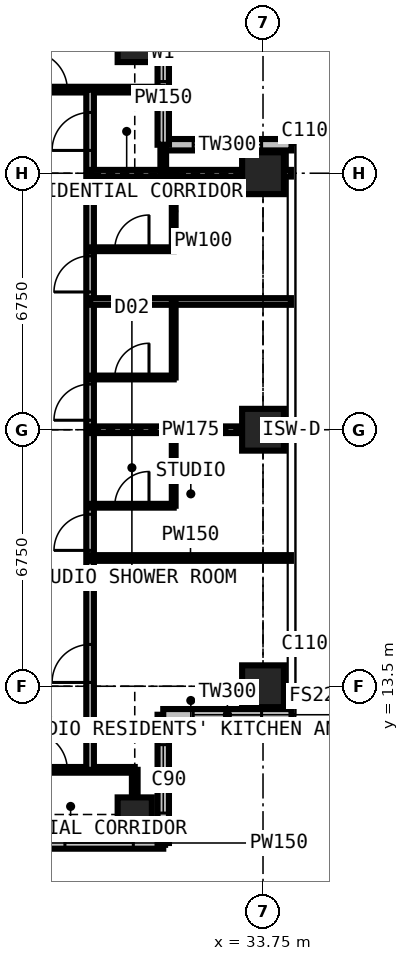
"""IFC4 building model, lengths in metres.
Left out: names, types, materials, properties, quantities, classifications, styles, units other than length and angle.
Written with IfcOpenShell. Run it as: python <this file> out.ifc"""

import sys

from ifc_helpers import new_model, si_unit, direction, frame, frame_2d, origin, origin_2d, place, context, subcontext, project, spatial, rectangle, extrude, element, fill, save


model = new_model("IFC4")
c1 = context("Model", 3, precision=1e-05, world=origin(), true_north=direction((0.0, 1.0)))
c2 = subcontext(c1, "Body", "Model", "MODEL_VIEW")
j1 = project(units=[si_unit("LENGTHUNIT", "METRE"), si_unit("PLANEANGLEUNIT", "RADIAN")], contexts=[c1])
p1 = place(None, origin())
s1 = spatial("IfcSite", under=j1, at=p1, CompositionType="ELEMENT")
p2 = place(p1, origin())
s2 = spatial("IfcBuilding", under=s1, at=p2, CompositionType="ELEMENT")
p3 = place(p2, frame((0.0, 0.0, 211.5)))
s3 = spatial("IfcBuildingStorey", under=s2, at=p3, CompositionType="ELEMENT", Elevation=211.5)
for number, where, z_axis, x_axis in (
    (1, (30.375, 10.125, 0.0), (0.0, 0.0, 1.0), (1.0, 0.0, 0.0)),
    (2, (30.375, 30.375, 0.0), (0.0, 0.0, 1.0), (1.0, 0.0, 0.0)),
):
    element("IfcColumn", number, at=place(p3, frame(where, z_axis=z_axis, x_axis=x_axis)), inside=s3, PredefinedType="COLUMN", context=c2, shape_type="SweptSolid", body=[
        extrude(rectangle(XDim=0.9, YDim=0.9, at=origin_2d()), origin(), (0.0, 0.0, 1.0), 3.6),
    ])
for number, where, z_axis, x_axis in (
    (3, (33.75, 13.5, 0.0), (0.0, 0.0, 1.0), (1.0, 0.0, 0.0)),
    (4, (33.75, 20.25, 0.0), (0.0, 0.0, 1.0), (1.0, 0.0, 0.0)),
    (5, (33.75, 27.0, 0.0), (0.0, 0.0, 1.0), (1.0, 0.0, 0.0)),
):
    element("IfcColumn", number, at=place(p3, frame(where, z_axis=z_axis, x_axis=x_axis)), inside=s3, PredefinedType="COLUMN", context=c2, shape_type="SweptSolid", body=[
        extrude(rectangle(XDim=1.1, YDim=1.1, at=origin_2d()), origin(), (0.0, 0.0, 1.0), 3.6),
    ])
p4 = place(p3, frame((34.5, 27.75, 0.0), z_axis=(0.0, 0.0, 1.0), x_axis=(-1.0, 0.0, 0.0)))
e6 = element("IfcWall", 6, at=p4, inside=s3, PredefinedType="SOLIDWALL", context=c2, shape_type="SweptSolid", body=[
    extrude(rectangle(XDim=3.375, YDim=0.3, at=frame_2d((1.688, 0.0))), origin(), (0.0, 0.0, 1.0), 3.375),
])
p5 = place(p4, frame((0.788, 0.0, 0.6)))
e7 = element("IfcOpeningElement", 7, at=p5, cuts=e6, PredefinedType="OPENING", context=c2, shape_type="SweptSolid", body=[
    extrude(rectangle(XDim=1.8, YDim=2.1, at=frame_2d((0.9, 1.05))), frame((0.0, 0.16, 0.0), z_axis=(0.0, -1.0, 0.0), x_axis=(1.0, 0.0, 0.0)), (0.0, 0.0, 1.0), 0.32),
])
p6 = place(p3, frame((31.125, 27.75, 0.0), z_axis=(0.0, 0.0, 1.0), x_axis=(0.0, 1.0, 0.0)))
e8 = element("IfcWall", 8, at=p6, inside=s3, PredefinedType="SOLIDWALL", context=c2, shape_type="SweptSolid", body=[
    extrude(rectangle(XDim=3.375, YDim=0.3, at=frame_2d((1.688, 0.0))), origin(), (0.0, 0.0, 1.0), 3.375),
])
p7 = place(p6, frame((1.663, 0.0, 0.9)))
e9 = element("IfcOpeningElement", 9, at=p7, cuts=e8, PredefinedType="OPENING", context=c2, shape_type="SweptSolid", body=[
    extrude(rectangle(XDim=1.5, YDim=1.8, at=frame_2d((0.75, 0.9))), frame((0.0, 0.16, 0.0), z_axis=(0.0, -1.0, 0.0), x_axis=(1.0, 0.0, 0.0)), (0.0, 0.0, 1.0), 0.32),
])
p8 = place(p3, frame((27.75, 9.375, 0.0), z_axis=(0.0, 0.0, 1.0), x_axis=(1.0, 0.0, 0.0)))
e10 = element("IfcWall", 10, at=p8, inside=s3, PredefinedType="SOLIDWALL", context=c2, shape_type="SweptSolid", body=[
    extrude(rectangle(XDim=3.375, YDim=0.3, at=frame_2d((1.688, 0.0))), origin(), (0.0, 0.0, 1.0), 3.375),
])
p9 = place(p8, frame((0.788, 0.0, 0.6)))
e11 = element("IfcOpeningElement", 11, at=p9, cuts=e10, PredefinedType="OPENING", context=c2, shape_type="SweptSolid", body=[
    extrude(rectangle(XDim=1.8, YDim=2.1, at=frame_2d((0.9, 1.05))), frame((0.0, 0.16, 0.0), z_axis=(0.0, -1.0, 0.0), x_axis=(1.0, 0.0, 0.0)), (0.0, 0.0, 1.0), 0.32),
])
p10 = place(p3, frame((31.125, 9.375, 0.0), z_axis=(0.0, 0.0, 1.0), x_axis=(0.0, 1.0, 0.0)))
e12 = element("IfcWall", 12, at=p10, inside=s3, PredefinedType="SOLIDWALL", context=c2, shape_type="SweptSolid", body=[
    extrude(rectangle(XDim=3.375, YDim=0.3, at=frame_2d((1.688, 0.0))), origin(), (0.0, 0.0, 1.0), 3.375),
])
p11 = place(p10, frame((0.788, 0.0, 0.6)))
e13 = element("IfcOpeningElement", 13, at=p11, cuts=e12, PredefinedType="OPENING", context=c2, shape_type="SweptSolid", body=[
    extrude(rectangle(XDim=1.8, YDim=2.1, at=frame_2d((0.9, 1.05))), frame((0.0, 0.16, 0.0), z_axis=(0.0, -1.0, 0.0), x_axis=(1.0, 0.0, 0.0)), (0.0, 0.0, 1.0), 0.32),
])
p12 = place(p3, frame((31.125, 12.75, 0.0), z_axis=(0.0, 0.0, 1.0), x_axis=(1.0, 0.0, 0.0)))
e14 = element("IfcWall", 14, at=p12, inside=s3, PredefinedType="SOLIDWALL", context=c2, shape_type="SweptSolid", body=[
    extrude(rectangle(XDim=3.375, YDim=0.3, at=frame_2d((1.688, 0.0))), origin(), (0.0, 0.0, 1.0), 3.375),
])
p13 = place(p12, frame((0.788, 0.0, 0.6)))
e15 = element("IfcOpeningElement", 15, at=p13, cuts=e14, PredefinedType="OPENING", context=c2, shape_type="SweptSolid", body=[
    extrude(rectangle(XDim=1.8, YDim=2.1, at=frame_2d((0.9, 1.05))), frame((0.0, 0.16, 0.0), z_axis=(0.0, -1.0, 0.0), x_axis=(1.0, 0.0, 0.0)), (0.0, 0.0, 1.0), 0.32),
])
p14 = place(p3, frame((11.3, 29.2, 0.0), z_axis=(0.0, 0.0, 1.0), x_axis=(1.0, 0.0, 0.0)))
e16 = element("IfcWall", 16, at=p14, inside=s3, PredefinedType="PARTITIONING", context=c2, shape_type="SweptSolid", body=[
    extrude(rectangle(XDim=19.809, YDim=0.15, at=frame_2d((9.904, 0.0))), origin(), (0.0, 0.0, 1.0), 3.375),
])
p15 = place(p14, frame((16.3, 0.0, 0.0)))
e17 = element("IfcOpeningElement", 17, at=p15, cuts=e16, PredefinedType="OPENING", context=c2, shape_type="SweptSolid", body=[
    extrude(rectangle(XDim=1.0, YDim=2.2, at=frame_2d((0.5, 1.1))), frame((0.0, 0.085, 0.0), z_axis=(0.0, -1.0, 0.0), x_axis=(1.0, 0.0, 0.0)), (0.0, 0.0, 1.0), 0.17),
])
p16 = place(p14, frame((5.825, 0.0, 0.0)))
e18 = element("IfcOpeningElement", 18, at=p16, cuts=e16, PredefinedType="OPENING", context=c2, shape_type="SweptSolid", body=[
    extrude(rectangle(XDim=0.95, YDim=2.2, at=frame_2d((0.475, 1.1))), frame((0.0, 0.085, 0.0), z_axis=(0.0, -1.0, 0.0), x_axis=(1.0, 0.0, 0.0)), (0.0, 0.0, 1.0), 0.17),
])
p17 = place(p14, frame((9.2, 0.0, 0.0)))
e19 = element("IfcOpeningElement", 19, at=p17, cuts=e16, PredefinedType="OPENING", context=c2, shape_type="SweptSolid", body=[
    extrude(rectangle(XDim=0.95, YDim=2.2, at=frame_2d((0.475, 1.1))), frame((0.0, 0.085, 0.0), z_axis=(0.0, -1.0, 0.0), x_axis=(1.0, 0.0, 0.0)), (0.0, 0.0, 1.0), 0.17),
])
p18 = place(p14, frame((12.575, 0.0, 0.0)))
e20 = element("IfcOpeningElement", 20, at=p18, cuts=e16, PredefinedType="OPENING", context=c2, shape_type="SweptSolid", body=[
    extrude(rectangle(XDim=0.95, YDim=2.2, at=frame_2d((0.475, 1.1))), frame((0.0, 0.085, 0.0), z_axis=(0.0, -1.0, 0.0), x_axis=(1.0, 0.0, 0.0)), (0.0, 0.0, 1.0), 0.17),
])
p19 = place(p14, frame((0.6, 0.0, 0.0)))
e21 = element("IfcOpeningElement", 21, at=p19, cuts=e16, PredefinedType="OPENING", context=c2, shape_type="SweptSolid", body=[
    extrude(rectangle(XDim=1.0, YDim=2.2, at=frame_2d((0.5, 1.1))), frame((0.0, 0.085, 0.0), z_axis=(0.0, -1.0, 0.0), x_axis=(1.0, 0.0, 0.0)), (0.0, 0.0, 1.0), 0.17),
])
p20 = place(p3, frame((27.0, 11.3, 0.0), z_axis=(0.0, 0.0, 1.0), x_axis=(1.0, 0.0, 0.0)))
e22 = element("IfcWall", 22, at=p20, inside=s3, PredefinedType="PARTITIONING", context=c2, shape_type="SweptSolid", body=[
    extrude(rectangle(XDim=3.375, YDim=0.15, at=frame_2d((1.688, 0.0))), origin(), (0.0, 0.0, 1.0), 3.375),
])
p21 = place(p20, frame((0.6, 0.0, 0.0)))
e23 = element("IfcOpeningElement", 23, at=p21, cuts=e22, PredefinedType="OPENING", context=c2, shape_type="SweptSolid", body=[
    extrude(rectangle(XDim=1.0, YDim=2.2, at=frame_2d((0.5, 1.1))), frame((0.0, 0.085, 0.0), z_axis=(0.0, -1.0, 0.0), x_axis=(1.0, 0.0, 0.0)), (0.0, 0.0, 1.0), 0.17),
])
p22 = place(p3, frame((29.2, 11.3, 0.0), z_axis=(0.0, 0.0, 1.0), x_axis=(0.0, 1.0, 0.0)))
e24 = element("IfcWall", 24, at=p22, inside=s3, PredefinedType="PARTITIONING", context=c2, shape_type="SweptSolid", body=[
    extrude(rectangle(XDim=17.9, YDim=0.2, at=frame_2d((8.95, 0.0))), origin(), (0.0, 0.0, 1.0), 3.375),
])
p23 = place(p22, frame((2.3, 0.0, 0.0)))
e25 = element("IfcOpeningElement", 25, at=p23, cuts=e24, PredefinedType="OPENING", context=c2, shape_type="SweptSolid", body=[
    extrude(rectangle(XDim=1.0, YDim=2.2, at=frame_2d((0.5, 1.1))), frame((0.0, 0.11, 0.0), z_axis=(0.0, -1.0, 0.0), x_axis=(1.0, 0.0, 0.0)), (0.0, 0.0, 1.0), 0.22),
])
p24 = place(p22, frame((5.775, 0.0, 0.0)))
e26 = element("IfcOpeningElement", 26, at=p24, cuts=e24, PredefinedType="OPENING", context=c2, shape_type="SweptSolid", body=[
    extrude(rectangle(XDim=0.95, YDim=2.2, at=frame_2d((0.475, 1.1))), frame((0.0, 0.11, 0.0), z_axis=(0.0, -1.0, 0.0), x_axis=(1.0, 0.0, 0.0)), (0.0, 0.0, 1.0), 0.22),
])
p25 = place(p22, frame((9.2, 0.0, 0.0)))
e27 = element("IfcOpeningElement", 27, at=p25, cuts=e24, PredefinedType="OPENING", context=c2, shape_type="SweptSolid", body=[
    extrude(rectangle(XDim=0.95, YDim=2.2, at=frame_2d((0.475, 1.1))), frame((0.0, 0.11, 0.0), z_axis=(0.0, -1.0, 0.0), x_axis=(1.0, 0.0, 0.0)), (0.0, 0.0, 1.0), 0.22),
])
p26 = place(p22, frame((12.575, 0.0, 0.0)))
e28 = element("IfcOpeningElement", 28, at=p26, cuts=e24, PredefinedType="OPENING", context=c2, shape_type="SweptSolid", body=[
    extrude(rectangle(XDim=0.95, YDim=2.2, at=frame_2d((0.475, 1.1))), frame((0.0, 0.11, 0.0), z_axis=(0.0, -1.0, 0.0), x_axis=(1.0, 0.0, 0.0)), (0.0, 0.0, 1.0), 0.22),
])
p27 = place(p22, frame((16.3, 0.0, 0.0)))
e29 = element("IfcOpeningElement", 29, at=p27, cuts=e24, PredefinedType="OPENING", context=c2, shape_type="SweptSolid", body=[
    extrude(rectangle(XDim=1.0, YDim=2.2, at=frame_2d((0.5, 1.1))), frame((0.0, 0.11, 0.0), z_axis=(0.0, -1.0, 0.0), x_axis=(1.0, 0.0, 0.0)), (0.0, 0.0, 1.0), 0.22),
])
p28 = place(p3, frame((29.2, 16.875, 0.0), z_axis=(0.0, 0.0, 1.0), x_axis=(1.0, 0.0, 0.0)))
e30 = element("IfcWall", 30, at=p28, inside=s3, PredefinedType="PARTITIONING", context=c2, shape_type="SweptSolid", body=[
    extrude(rectangle(XDim=5.284, YDim=0.15, at=frame_2d((2.642, 0.0))), origin(), (0.0, 0.0, 1.0), 3.375),
])
p29 = place(p3, frame((29.2, 18.25, 0.0), z_axis=(0.0, 0.0, 1.0), x_axis=(1.0, 0.0, 0.0)))
e31 = element("IfcWall", 31, at=p29, inside=s3, PredefinedType="PARTITIONING", context=c2, shape_type="SweptSolid", body=[
    extrude(rectangle(XDim=2.2, YDim=0.1, at=frame_2d((1.1, 0.0))), origin(), (0.0, 0.0, 1.0), 3.375),
])
p30 = place(p29, frame((0.65, 0.0, 0.0)))
e32 = element("IfcOpeningElement", 32, at=p30, cuts=e31, PredefinedType="OPENING", context=c2, shape_type="SweptSolid", body=[
    extrude(rectangle(XDim=0.9, YDim=2.2, at=frame_2d((0.45, 1.1))), frame((0.0, 0.06, 0.0), z_axis=(0.0, -1.0, 0.0), x_axis=(1.0, 0.0, 0.0)), (0.0, 0.0, 1.0), 0.12),
])
p31 = place(p3, frame((29.2, 20.25, 0.0), z_axis=(0.0, 0.0, 1.0), x_axis=(1.0, 0.0, 0.0)))
e33 = element("IfcWall", 33, at=p31, inside=s3, PredefinedType="PARTITIONING", context=c2, shape_type="SweptSolid", body=[
    extrude(rectangle(XDim=5.284, YDim=0.175, at=frame_2d((2.642, 0.0))), origin(), (0.0, 0.0, 1.0), 2.877),
])
p32 = place(p3, frame((29.2, 21.625, 0.0), z_axis=(0.0, 0.0, 1.0), x_axis=(1.0, 0.0, 0.0)))
e34 = element("IfcWall", 34, at=p32, inside=s3, PredefinedType="PARTITIONING", context=c2, shape_type="SweptSolid", body=[
    extrude(rectangle(XDim=2.2, YDim=0.1, at=frame_2d((1.1, 0.0))), origin(), (0.0, 0.0, 1.0), 3.375),
])
p33 = place(p32, frame((0.65, 0.0, 0.0)))
e35 = element("IfcOpeningElement", 35, at=p33, cuts=e34, PredefinedType="OPENING", context=c2, shape_type="SweptSolid", body=[
    extrude(rectangle(XDim=0.9, YDim=2.2, at=frame_2d((0.45, 1.1))), frame((0.0, 0.06, 0.0), z_axis=(0.0, -1.0, 0.0), x_axis=(1.0, 0.0, 0.0)), (0.0, 0.0, 1.0), 0.12),
])
p34 = place(p3, frame((29.2, 23.625, 0.0), z_axis=(0.0, 0.0, 1.0), x_axis=(1.0, 0.0, 0.0)))
e36 = element("IfcWall", 36, at=p34, inside=s3, PredefinedType="PARTITIONING", context=c2, shape_type="SweptSolid", body=[
    extrude(rectangle(XDim=5.284, YDim=0.175, at=frame_2d((2.642, 0.0))), origin(), (0.0, 0.0, 1.0), 3.375),
])
p35 = place(p3, frame((29.2, 25.0, 0.0), z_axis=(0.0, 0.0, 1.0), x_axis=(1.0, 0.0, 0.0)))
e37 = element("IfcWall", 37, at=p35, inside=s3, PredefinedType="PARTITIONING", context=c2, shape_type="SweptSolid", body=[
    extrude(rectangle(XDim=2.2, YDim=0.1, at=frame_2d((1.1, 0.0))), origin(), (0.0, 0.0, 1.0), 3.375),
])
p36 = place(p35, frame((0.65, 0.0, 0.0)))
e38 = element("IfcOpeningElement", 38, at=p36, cuts=e37, PredefinedType="OPENING", context=c2, shape_type="SweptSolid", body=[
    extrude(rectangle(XDim=0.9, YDim=2.2, at=frame_2d((0.45, 1.1))), frame((0.0, 0.06, 0.0), z_axis=(0.0, -1.0, 0.0), x_axis=(1.0, 0.0, 0.0)), (0.0, 0.0, 1.0), 0.12),
])
p37 = place(p3, frame((29.2, 27.0, 0.0), z_axis=(0.0, 0.0, 1.0), x_axis=(1.0, 0.0, 0.0)))
e39 = element("IfcWall", 39, at=p37, inside=s3, PredefinedType="PARTITIONING", context=c2, shape_type="SweptSolid", body=[
    extrude(rectangle(XDim=5.284, YDim=0.175, at=frame_2d((2.642, 0.0))), origin(), (0.0, 0.0, 1.0), 2.877),
])
p38 = place(p3, frame((30.375, 9.525, 0.0), z_axis=(0.0, 0.0, 1.0), x_axis=(0.0, 1.0, 0.0)))
e40 = element("IfcWall", 40, at=p38, inside=s3, PredefinedType="PARTITIONING", context=c2, shape_type="SweptSolid", body=[
    extrude(rectangle(XDim=1.775, YDim=0.15, at=frame_2d((0.888, 0.0))), origin(), (0.0, 0.0, 1.0), 2.877),
])
p39 = place(p3, frame((31.125, 27.0, 0.0), z_axis=(0.0, 0.0, 1.0), x_axis=(0.0, 1.0, 0.0)))
e41 = element("IfcWall", 41, at=p39, inside=s3, PredefinedType="PARTITIONING", context=c2, shape_type="SweptSolid", body=[
    extrude(rectangle(XDim=0.734, YDim=0.15, at=frame_2d((0.367, 0.0))), origin(), (0.0, 0.0, 1.0), 3.375),
])
for number, where, z_axis, x_axis in (
    (42, (31.4, 18.25, 0.0), (0.0, 0.0, 1.0), (0.0, 1.0, 0.0)),
    (43, (31.4, 21.625, 0.0), (0.0, 0.0, 1.0), (0.0, 1.0, 0.0)),
    (44, (31.4, 25.0, 0.0), (0.0, 0.0, 1.0), (0.0, 1.0, 0.0)),
):
    element("IfcWall", number, at=place(p3, frame(where, z_axis=z_axis, x_axis=x_axis)), inside=s3, PredefinedType="PARTITIONING", context=c2, shape_type="SweptSolid", body=[
        extrude(rectangle(XDim=2.0, YDim=0.1, at=frame_2d((1.0, 0.0))), origin(), (0.0, 0.0, 1.0), 3.375),
    ])
p40 = place(p5, origin())
e45 = element("IfcWindow", 45, at=p40, inside=s3, PartitioningType="SINGLE_PANEL", PredefinedType="WINDOW", context=c2, shape_type="SweptSolid", body=[
    extrude(rectangle(XDim=1.8, YDim=2.1, at=frame_2d((0.9, 1.05))), frame((0.0, 0.03, 0.0), z_axis=(0.0, -1.0, 0.0), x_axis=(1.0, 0.0, 0.0)), (0.0, 0.0, 1.0), 0.06),
])
fill(e7, e45)
p41 = place(p7, origin())
e46 = element("IfcWindow", 46, at=p41, inside=s3, PartitioningType="SINGLE_PANEL", PredefinedType="WINDOW", context=c2, shape_type="SweptSolid", body=[
    extrude(rectangle(XDim=1.5, YDim=1.8, at=frame_2d((0.75, 0.9))), frame((0.0, 0.03, 0.0), z_axis=(0.0, -1.0, 0.0), x_axis=(1.0, 0.0, 0.0)), (0.0, 0.0, 1.0), 0.06),
])
fill(e9, e46)
p42 = place(p9, origin())
e47 = element("IfcWindow", 47, at=p42, inside=s3, PartitioningType="SINGLE_PANEL", PredefinedType="WINDOW", context=c2, shape_type="SweptSolid", body=[
    extrude(rectangle(XDim=1.8, YDim=2.1, at=frame_2d((0.9, 1.05))), frame((0.0, 0.03, 0.0), z_axis=(0.0, -1.0, 0.0), x_axis=(1.0, 0.0, 0.0)), (0.0, 0.0, 1.0), 0.06),
])
fill(e11, e47)
p43 = place(p11, origin())
e48 = element("IfcWindow", 48, at=p43, inside=s3, PartitioningType="SINGLE_PANEL", PredefinedType="WINDOW", context=c2, shape_type="SweptSolid", body=[
    extrude(rectangle(XDim=1.8, YDim=2.1, at=frame_2d((0.9, 1.05))), frame((0.0, 0.03, 0.0), z_axis=(0.0, -1.0, 0.0), x_axis=(1.0, 0.0, 0.0)), (0.0, 0.0, 1.0), 0.06),
])
fill(e13, e48)
p44 = place(p13, origin())
e49 = element("IfcWindow", 49, at=p44, inside=s3, PartitioningType="SINGLE_PANEL", PredefinedType="WINDOW", context=c2, shape_type="SweptSolid", body=[
    extrude(rectangle(XDim=1.8, YDim=2.1, at=frame_2d((0.9, 1.05))), frame((0.0, 0.03, 0.0), z_axis=(0.0, -1.0, 0.0), x_axis=(1.0, 0.0, 0.0)), (0.0, 0.0, 1.0), 0.06),
])
fill(e15, e49)
p45 = place(p21, origin())
e50 = element("IfcDoor", 50, at=p45, inside=s3, OperationType="SINGLE_SWING_LEFT", PredefinedType="DOOR", context=c2, shape_type="SweptSolid", body=[
    extrude(rectangle(XDim=1.0, YDim=2.2, at=frame_2d((0.5, 1.1))), frame((0.0, 0.025, 0.0), z_axis=(0.0, -1.0, 0.0), x_axis=(1.0, 0.0, 0.0)), (0.0, 0.0, 1.0), 0.05),
])
fill(e23, e50)
p46 = place(p23, origin())
e51 = element("IfcDoor", 51, at=p46, inside=s3, OperationType="SINGLE_SWING_LEFT", PredefinedType="DOOR", context=c2, shape_type="SweptSolid", body=[
    extrude(rectangle(XDim=1.0, YDim=2.2, at=frame_2d((0.5, 1.1))), frame((0.0, 0.025, 0.0), z_axis=(0.0, -1.0, 0.0), x_axis=(1.0, 0.0, 0.0)), (0.0, 0.0, 1.0), 0.05),
])
fill(e25, e51)
p47 = place(p24, origin())
e52 = element("IfcDoor", 52, at=p47, inside=s3, OperationType="SINGLE_SWING_LEFT", PredefinedType="DOOR", context=c2, shape_type="SweptSolid", body=[
    extrude(rectangle(XDim=0.95, YDim=2.2, at=frame_2d((0.475, 1.1))), frame((0.0, 0.025, 0.0), z_axis=(0.0, -1.0, 0.0), x_axis=(1.0, 0.0, 0.0)), (0.0, 0.0, 1.0), 0.05),
])
fill(e26, e52)
p48 = place(p30, origin())
e53 = element("IfcDoor", 53, at=p48, inside=s3, OperationType="SINGLE_SWING_RIGHT", PredefinedType="DOOR", context=c2, shape_type="SweptSolid", body=[
    extrude(rectangle(XDim=0.9, YDim=2.2, at=frame_2d((0.45, 1.1))), frame((0.0, 0.025, 0.0), z_axis=(0.0, -1.0, 0.0), x_axis=(1.0, 0.0, 0.0)), (0.0, 0.0, 1.0), 0.05),
])
fill(e32, e53)
p49 = place(p25, origin())
e54 = element("IfcDoor", 54, at=p49, inside=s3, OperationType="SINGLE_SWING_LEFT", PredefinedType="DOOR", context=c2, shape_type="SweptSolid", body=[
    extrude(rectangle(XDim=0.95, YDim=2.2, at=frame_2d((0.475, 1.1))), frame((0.0, 0.025, 0.0), z_axis=(0.0, -1.0, 0.0), x_axis=(1.0, 0.0, 0.0)), (0.0, 0.0, 1.0), 0.05),
])
fill(e27, e54)
p50 = place(p33, origin())
e55 = element("IfcDoor", 55, at=p50, inside=s3, OperationType="SINGLE_SWING_RIGHT", PredefinedType="DOOR", context=c2, shape_type="SweptSolid", body=[
    extrude(rectangle(XDim=0.9, YDim=2.2, at=frame_2d((0.45, 1.1))), frame((0.0, 0.025, 0.0), z_axis=(0.0, -1.0, 0.0), x_axis=(1.0, 0.0, 0.0)), (0.0, 0.0, 1.0), 0.05),
])
fill(e35, e55)
p51 = place(p26, origin())
e56 = element("IfcDoor", 56, at=p51, inside=s3, OperationType="SINGLE_SWING_LEFT", PredefinedType="DOOR", context=c2, shape_type="SweptSolid", body=[
    extrude(rectangle(XDim=0.95, YDim=2.2, at=frame_2d((0.475, 1.1))), frame((0.0, 0.025, 0.0), z_axis=(0.0, -1.0, 0.0), x_axis=(1.0, 0.0, 0.0)), (0.0, 0.0, 1.0), 0.05),
])
fill(e28, e56)
p52 = place(p36, origin())
e57 = element("IfcDoor", 57, at=p52, inside=s3, OperationType="SINGLE_SWING_RIGHT", PredefinedType="DOOR", context=c2, shape_type="SweptSolid", body=[
    extrude(rectangle(XDim=0.9, YDim=2.2, at=frame_2d((0.45, 1.1))), frame((0.0, 0.025, 0.0), z_axis=(0.0, -1.0, 0.0), x_axis=(1.0, 0.0, 0.0)), (0.0, 0.0, 1.0), 0.05),
])
fill(e38, e57)
p53 = place(p27, origin())
e58 = element("IfcDoor", 58, at=p53, inside=s3, OperationType="SINGLE_SWING_LEFT", PredefinedType="DOOR", context=c2, shape_type="SweptSolid", body=[
    extrude(rectangle(XDim=1.0, YDim=2.2, at=frame_2d((0.5, 1.1))), frame((0.0, 0.025, 0.0), z_axis=(0.0, -1.0, 0.0), x_axis=(1.0, 0.0, 0.0)), (0.0, 0.0, 1.0), 0.05),
])
fill(e29, e58)
p54 = place(p15, origin())
e59 = element("IfcDoor", 59, at=p54, inside=s3, OperationType="SINGLE_SWING_LEFT", PredefinedType="DOOR", context=c2, shape_type="SweptSolid", body=[
    extrude(rectangle(XDim=1.0, YDim=2.2, at=frame_2d((0.5, 1.1))), frame((0.0, 0.025, 0.0), z_axis=(0.0, -1.0, 0.0), x_axis=(1.0, 0.0, 0.0)), (0.0, 0.0, 1.0), 0.05),
])
fill(e17, e59)
save(model, sys.argv[1])
